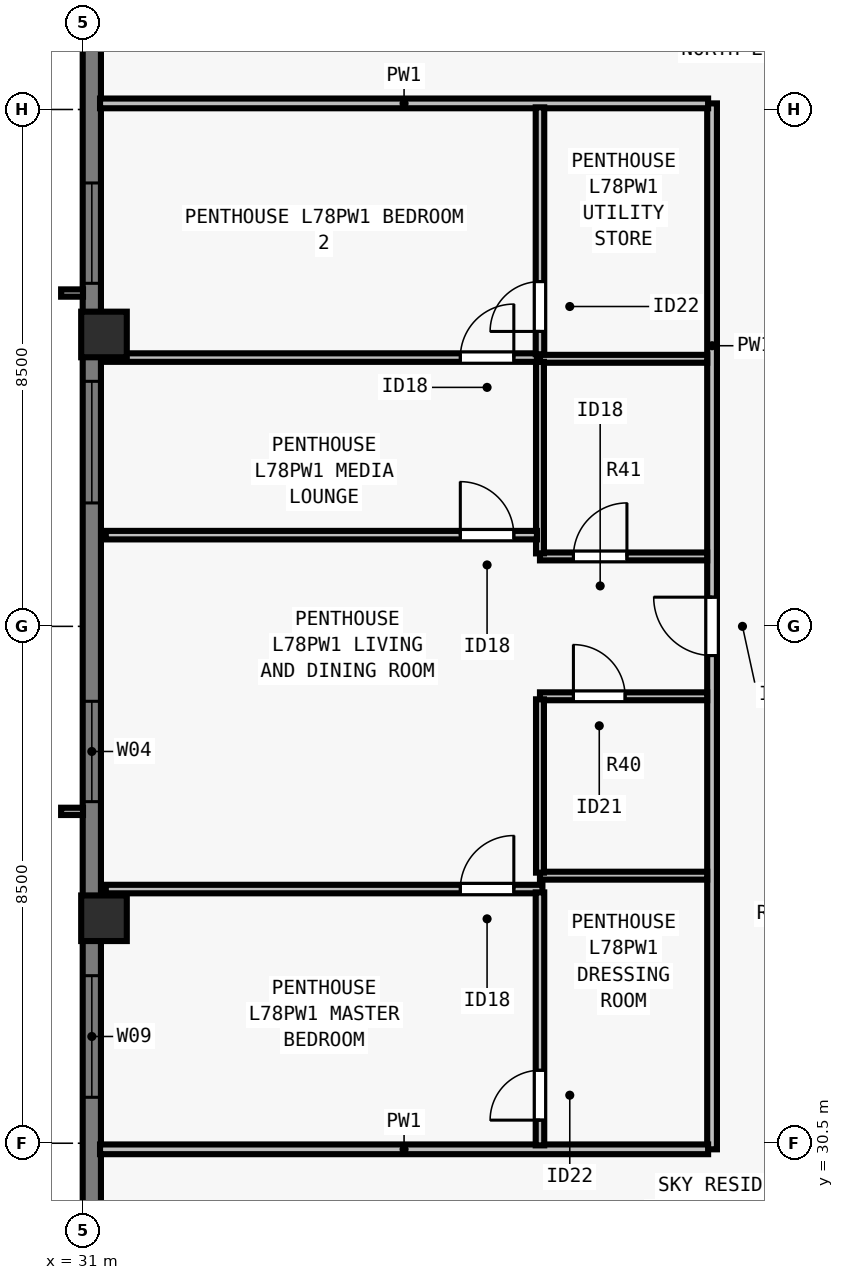
"""IFC4 building model, lengths in metres.
Left out: names, types, materials, properties, quantities, classifications, styles, units other than length and angle.
Written with IfcOpenShell. Run it as: python <this file> out.ifc"""

import sys

from ifc_helpers import new_model, si_unit, direction, frame, frame_2d, origin, origin_2d, place, context, subcontext, project, spatial, rectangle, extrude, element, fill, save


model = new_model("IFC4")
c1 = context("Model", 3, precision=1e-05, world=origin(), true_north=direction((0.0, 1.0)))
c2 = subcontext(c1, "Body", "Model", "MODEL_VIEW")
j1 = project(units=[si_unit("LENGTHUNIT", "METRE"), si_unit("PLANEANGLEUNIT", "RADIAN")], contexts=[c1])
p1 = place(None, origin())
s1 = spatial("IfcSite", under=j1, at=p1, CompositionType="ELEMENT")
p2 = place(p1, origin())
s2 = spatial("IfcBuilding", under=s1, at=p2, CompositionType="ELEMENT")
p3 = place(p2, frame((0.0, 0.0, 284.0)))
s3 = spatial("IfcBuildingStorey", under=s2, at=p3, CompositionType="ELEMENT", Elevation=284.0)
for number, where, z_axis, x_axis in (
    (1, (31.35, 43.8, 0.0), (0.0, 0.0, 1.0), (0.0, 1.0, 0.0)),
    (2, (31.35, 34.2, 0.0), (0.0, 0.0, 1.0), (0.0, 1.0, 0.0)),
):
    element("IfcColumn", number, at=place(p3, frame(where, z_axis=z_axis, x_axis=x_axis)), inside=s3, PredefinedType="COLUMN", context=c2, shape_type="SweptSolid", body=[
        extrude(rectangle(XDim=0.75, YDim=0.75, at=origin_2d()), origin(), (0.0, 0.0, 1.0), 3.5),
    ])
p4 = place(p3, frame((31.15, 23.5, 0.0), z_axis=(0.0, 0.0, 1.0), x_axis=(0.0, 1.0, 0.0)))
e3 = element("IfcWall", 3, at=p4, inside=s3, PredefinedType="SOLIDWALL", context=c2, shape_type="SweptSolid", body=[
    extrude(rectangle(XDim=30.722, YDim=0.3, at=frame_2d((15.361, 0.0))), origin(), (0.0, 0.0, 1.0), 3.29),
])
p5 = place(p4, frame((7.756, 0.0, 0.8)))
e4 = element("IfcOpeningElement", 4, at=p5, cuts=e3, PredefinedType="OPENING", context=c2, shape_type="SweptSolid", body=[
    extrude(rectangle(XDim=2.0, YDim=1.758, at=frame_2d((1.0, 0.879))), frame((0.0, 0.16, 0.0), z_axis=(0.0, -1.0, 0.0), x_axis=(1.0, 0.0, 0.0)), (0.0, 0.0, 1.0), 0.32),
])
p6 = place(p4, frame((12.617, 0.0, 0.8)))
e5 = element("IfcOpeningElement", 5, at=p6, cuts=e3, PredefinedType="OPENING", context=c2, shape_type="SweptSolid", body=[
    extrude(rectangle(XDim=1.65, YDim=1.758, at=frame_2d((0.825, 0.879))), frame((0.0, 0.16, 0.0), z_axis=(0.0, -1.0, 0.0), x_axis=(1.0, 0.0, 0.0)), (0.0, 0.0, 1.0), 0.32),
])
p7 = place(p4, frame((17.53, 0.0, 0.8)))
e6 = element("IfcOpeningElement", 6, at=p7, cuts=e3, PredefinedType="OPENING", context=c2, shape_type="SweptSolid", body=[
    extrude(rectangle(XDim=2.0, YDim=1.758, at=frame_2d((1.0, 0.879))), frame((0.0, 0.16, 0.0), z_axis=(0.0, -1.0, 0.0), x_axis=(1.0, 0.0, 0.0)), (0.0, 0.0, 1.0), 0.32),
])
p8 = place(p4, frame((21.142, 0.0, 0.8)))
e7 = element("IfcOpeningElement", 7, at=p8, cuts=e3, PredefinedType="OPENING", context=c2, shape_type="SweptSolid", body=[
    extrude(rectangle(XDim=1.65, YDim=1.758, at=frame_2d((0.825, 0.879))), frame((0.0, 0.16, 0.0), z_axis=(0.0, -1.0, 0.0), x_axis=(1.0, 0.0, 0.0)), (0.0, 0.0, 1.0), 0.32),
])
p9 = place(p4, frame((26.63, 0.0, 0.8)))
e8 = element("IfcOpeningElement", 8, at=p9, cuts=e3, PredefinedType="OPENING", context=c2, shape_type="SweptSolid", body=[
    extrude(rectangle(XDim=0.9, YDim=1.75, at=frame_2d((0.45, 0.875))), frame((0.0, 0.16, 0.0), z_axis=(0.0, -1.0, 0.0), x_axis=(1.0, 0.0, 0.0)), (0.0, 0.0, 1.0), 0.32),
])
p10 = place(p3, frame((41.35, 30.4, 0.0), z_axis=(0.0, 0.0, 1.0), x_axis=(0.0, 1.0, 0.0)))
e9 = element("IfcWall", 9, at=p10, inside=s3, PredefinedType="PARTITIONING", context=c2, shape_type="SweptSolid", body=[
    extrude(rectangle(XDim=17.2, YDim=0.16, at=frame_2d((8.6, 0.0))), origin(), (0.0, 0.0, 1.0), 3.009),
])
p11 = place(p10, frame((8.12, 0.0, 0.0)))
e10 = element("IfcOpeningElement", 10, at=p11, cuts=e9, PredefinedType="OPENING", context=c2, shape_type="SweptSolid", body=[
    extrude(rectangle(XDim=0.96, YDim=2.18, at=frame_2d((0.48, 1.09))), frame((0.0, 0.09, 0.0), z_axis=(0.0, -1.0, 0.0), x_axis=(1.0, 0.0, 0.0)), (0.0, 0.0, 1.0), 0.18),
])
for number, where, z_axis, x_axis in (
    (11, (31.285, 30.4, 0.0), (0.0, 0.0, 1.0), (1.0, 0.0, 0.0)),
    (12, (31.285, 47.6, 0.0), (0.0, 0.0, 1.0), (1.0, 0.0, 0.0)),
):
    element("IfcWall", number, at=place(p3, frame(where, z_axis=z_axis, x_axis=x_axis)), inside=s3, PredefinedType="PARTITIONING", context=c2, shape_type="SweptSolid", body=[
        extrude(rectangle(XDim=10.0, YDim=0.16, at=frame_2d((5.0, 0.0))), origin(), (0.0, 0.0, 1.0), 3.29),
    ])
p12 = place(p3, frame((38.52, 34.9, 0.0), z_axis=(0.0, 0.0, 1.0), x_axis=(1.0, 0.0, 0.0)))
e13 = element("IfcWall", 13, at=p12, inside=s3, PredefinedType="PLUMBINGWALL", context=c2, shape_type="SweptSolid", body=[
    extrude(rectangle(XDim=2.75, YDim=0.13, at=frame_2d((1.375, 0.0))), origin(), (0.0, 0.0, 1.0), 3.29),
])
p13 = place(p3, frame((38.52, 37.85, 0.0), z_axis=(0.0, 0.0, 1.0), x_axis=(1.0, 0.0, 0.0)))
e14 = element("IfcWall", 14, at=p13, inside=s3, PredefinedType="PLUMBINGWALL", context=c2, shape_type="SweptSolid", body=[
    extrude(rectangle(XDim=2.75, YDim=0.13, at=frame_2d((1.375, 0.0))), origin(), (0.0, 0.0, 1.0), 3.29),
])
p14 = place(p13, frame((0.55, 0.0, 0.0)))
e15 = element("IfcOpeningElement", 15, at=p14, cuts=e14, PredefinedType="OPENING", context=c2, shape_type="SweptSolid", body=[
    extrude(rectangle(XDim=0.85, YDim=2.08, at=frame_2d((0.425, 1.04))), frame((0.0, 0.075, 0.0), z_axis=(0.0, -1.0, 0.0), x_axis=(1.0, 0.0, 0.0)), (0.0, 0.0, 1.0), 0.15),
])
p15 = place(p3, frame((38.52, 34.95, 0.0), z_axis=(0.0, 0.0, 1.0), x_axis=(0.0, 1.0, 0.0)))
e16 = element("IfcWall", 16, at=p15, inside=s3, PredefinedType="PLUMBINGWALL", context=c2, shape_type="SweptSolid", body=[
    extrude(rectangle(XDim=2.85, YDim=0.13, at=frame_2d((1.425, 0.0))), origin(), (0.0, 0.0, 1.0), 3.29),
])
p16 = place(p3, frame((38.52, 43.4, 0.0), z_axis=(0.0, 0.0, 1.0), x_axis=(1.0, 0.0, 0.0)))
e17 = element("IfcWall", 17, at=p16, inside=s3, PredefinedType="PLUMBINGWALL", context=c2, shape_type="SweptSolid", body=[
    extrude(rectangle(XDim=2.75, YDim=0.13, at=frame_2d((1.375, 0.0))), origin(), (0.0, 0.0, 1.0), 3.29),
])
p17 = place(p3, frame((38.52, 40.15, 0.0), z_axis=(0.0, 0.0, 1.0), x_axis=(1.0, 0.0, 0.0)))
e18 = element("IfcWall", 18, at=p17, inside=s3, PredefinedType="PLUMBINGWALL", context=c2, shape_type="SweptSolid", body=[
    extrude(rectangle(XDim=2.75, YDim=0.13, at=frame_2d((1.375, 0.0))), origin(), (0.0, 0.0, 1.0), 3.29),
])
p18 = place(p17, frame((0.55, 0.0, 0.0)))
e19 = element("IfcOpeningElement", 19, at=p18, cuts=e18, PredefinedType="OPENING", context=c2, shape_type="SweptSolid", body=[
    extrude(rectangle(XDim=0.88, YDim=2.1, at=frame_2d((0.44, 1.05))), frame((0.0, 0.075, 0.0), z_axis=(0.0, -1.0, 0.0), x_axis=(1.0, 0.0, 0.0)), (0.0, 0.0, 1.0), 0.15),
])
p19 = place(p3, frame((38.52, 40.2, 0.0), z_axis=(0.0, 0.0, 1.0), x_axis=(0.0, 1.0, 0.0)))
e20 = element("IfcWall", 20, at=p19, inside=s3, PredefinedType="PLUMBINGWALL", context=c2, shape_type="SweptSolid", body=[
    extrude(rectangle(XDim=3.15, YDim=0.13, at=frame_2d((1.575, 0.0))), origin(), (0.0, 0.0, 1.0), 3.009),
])
p20 = place(p3, frame((31.38, 34.68, 0.0), z_axis=(0.0, 0.0, 1.0), x_axis=(1.0, 0.0, 0.0)))
e21 = element("IfcWall", 21, at=p20, inside=s3, PredefinedType="PARTITIONING", context=c2, shape_type="SweptSolid", body=[
    extrude(rectangle(XDim=7.18, YDim=0.14, at=frame_2d((3.59, 0.0))), origin(), (0.0, 0.0, 1.0), 3.29),
])
p21 = place(p20, frame((5.83, 0.0, 0.0)))
e22 = element("IfcOpeningElement", 22, at=p21, cuts=e21, PredefinedType="OPENING", context=c2, shape_type="SweptSolid", body=[
    extrude(rectangle(XDim=0.88, YDim=2.1, at=frame_2d((0.44, 1.05))), frame((0.0, 0.08, 0.0), z_axis=(0.0, -1.0, 0.0), x_axis=(1.0, 0.0, 0.0)), (0.0, 0.0, 1.0), 0.16),
])
p22 = place(p3, frame((38.52, 30.465, 0.0), z_axis=(0.0, 0.0, 1.0), x_axis=(0.0, 1.0, 0.0)))
e23 = element("IfcWall", 23, at=p22, inside=s3, PredefinedType="PARTITIONING", context=c2, shape_type="SweptSolid", body=[
    extrude(rectangle(XDim=4.16, YDim=0.14, at=frame_2d((2.08, 0.0))), origin(), (0.0, 0.0, 1.0), 3.29),
])
p23 = place(p22, frame((0.415, 0.0, 0.0)))
e24 = element("IfcOpeningElement", 24, at=p23, cuts=e23, PredefinedType="OPENING", context=c2, shape_type="SweptSolid", body=[
    extrude(rectangle(XDim=0.82, YDim=2.1, at=frame_2d((0.41, 1.05))), frame((0.0, 0.08, 0.0), z_axis=(0.0, -1.0, 0.0), x_axis=(1.0, 0.0, 0.0)), (0.0, 0.0, 1.0), 0.16),
])
p24 = place(p3, frame((31.38, 43.42, 0.0), z_axis=(0.0, 0.0, 1.0), x_axis=(1.0, 0.0, 0.0)))
e25 = element("IfcWall", 25, at=p24, inside=s3, PredefinedType="PARTITIONING", context=c2, shape_type="SweptSolid", body=[
    extrude(rectangle(XDim=7.09, YDim=0.14, at=frame_2d((3.545, 0.0))), origin(), (0.0, 0.0, 1.0), 3.29),
])
p25 = place(p24, frame((5.83, 0.0, 0.0)))
e26 = element("IfcOpeningElement", 26, at=p25, cuts=e25, PredefinedType="OPENING", context=c2, shape_type="SweptSolid", body=[
    extrude(rectangle(XDim=0.88, YDim=2.1, at=frame_2d((0.44, 1.05))), frame((0.0, 0.08, 0.0), z_axis=(0.0, -1.0, 0.0), x_axis=(1.0, 0.0, 0.0)), (0.0, 0.0, 1.0), 0.16),
])
p26 = place(p3, frame((38.52, 43.475, 0.0), z_axis=(0.0, 0.0, 1.0), x_axis=(0.0, 1.0, 0.0)))
e27 = element("IfcWall", 27, at=p26, inside=s3, PredefinedType="PARTITIONING", context=c2, shape_type="SweptSolid", body=[
    extrude(rectangle(XDim=4.06, YDim=0.14, at=frame_2d((2.03, 0.0))), origin(), (0.0, 0.0, 1.0), 3.29),
])
p27 = place(p26, frame((0.375, 0.0, 0.0)))
e28 = element("IfcOpeningElement", 28, at=p27, cuts=e27, PredefinedType="OPENING", context=c2, shape_type="SweptSolid", body=[
    extrude(rectangle(XDim=0.82, YDim=2.1, at=frame_2d((0.41, 1.05))), frame((0.0, 0.08, 0.0), z_axis=(0.0, -1.0, 0.0), x_axis=(1.0, 0.0, 0.0)), (0.0, 0.0, 1.0), 0.16),
])
p28 = place(p3, frame((31.38, 40.5, 0.0), z_axis=(0.0, 0.0, 1.0), x_axis=(1.0, 0.0, 0.0)))
e29 = element("IfcWall", 29, at=p28, inside=s3, PredefinedType="PARTITIONING", context=c2, shape_type="SweptSolid", body=[
    extrude(rectangle(XDim=7.09, YDim=0.14, at=frame_2d((3.545, 0.0))), origin(), (0.0, 0.0, 1.0), 3.29),
])
p29 = place(p28, frame((5.83, 0.0, 0.0)))
e30 = element("IfcOpeningElement", 30, at=p29, cuts=e29, PredefinedType="OPENING", context=c2, shape_type="SweptSolid", body=[
    extrude(rectangle(XDim=0.88, YDim=2.1, at=frame_2d((0.44, 1.05))), frame((0.0, 0.08, 0.0), z_axis=(0.0, -1.0, 0.0), x_axis=(1.0, 0.0, 0.0)), (0.0, 0.0, 1.0), 0.16),
])
p30 = place(p5, origin())
e31 = element("IfcWindow", 31, at=p30, inside=s3, PartitioningType="SINGLE_PANEL", PredefinedType="WINDOW", context=c2, shape_type="SweptSolid", body=[
    extrude(rectangle(XDim=2.0, YDim=1.758, at=frame_2d((1.0, 0.879))), frame((0.0, -0.05, 0.0), z_axis=(0.0, -1.0, 0.0), x_axis=(1.0, 0.0, 0.0)), (0.0, 0.0, 1.0), 0.06),
])
fill(e4, e31)
p31 = place(p6, origin())
e32 = element("IfcWindow", 32, at=p31, inside=s3, PartitioningType="SINGLE_PANEL", PredefinedType="WINDOW", context=c2, shape_type="SweptSolid", body=[
    extrude(rectangle(XDim=1.65, YDim=1.758, at=frame_2d((0.825, 0.879))), frame((0.0, -0.05, 0.0), z_axis=(0.0, -1.0, 0.0), x_axis=(1.0, 0.0, 0.0)), (0.0, 0.0, 1.0), 0.06),
])
fill(e5, e32)
p32 = place(p7, origin())
e33 = element("IfcWindow", 33, at=p32, inside=s3, PartitioningType="SINGLE_PANEL", PredefinedType="WINDOW", context=c2, shape_type="SweptSolid", body=[
    extrude(rectangle(XDim=2.0, YDim=1.758, at=frame_2d((1.0, 0.879))), frame((0.0, -0.05, 0.0), z_axis=(0.0, -1.0, 0.0), x_axis=(1.0, 0.0, 0.0)), (0.0, 0.0, 1.0), 0.06),
])
fill(e6, e33)
p33 = place(p8, origin())
e34 = element("IfcWindow", 34, at=p33, inside=s3, PartitioningType="SINGLE_PANEL", PredefinedType="WINDOW", context=c2, shape_type="SweptSolid", body=[
    extrude(rectangle(XDim=1.65, YDim=1.758, at=frame_2d((0.825, 0.879))), frame((0.0, -0.05, 0.0), z_axis=(0.0, -1.0, 0.0), x_axis=(1.0, 0.0, 0.0)), (0.0, 0.0, 1.0), 0.06),
])
fill(e7, e34)
p34 = place(p14, origin())
e35 = element("IfcDoor", 35, at=p34, inside=s3, OperationType="SINGLE_SWING_LEFT", PredefinedType="DOOR", context=c2, shape_type="SweptSolid", body=[
    extrude(rectangle(XDim=0.85, YDim=2.08, at=frame_2d((0.425, 1.04))), frame((0.0, 0.025, 0.0), z_axis=(0.0, -1.0, 0.0), x_axis=(1.0, 0.0, 0.0)), (0.0, 0.0, 1.0), 0.05),
])
fill(e15, e35)
p35 = place(p18, origin())
e36 = element("IfcDoor", 36, at=p35, inside=s3, OperationType="SINGLE_SWING_RIGHT", PredefinedType="DOOR", context=c2, shape_type="SweptSolid", body=[
    extrude(rectangle(XDim=0.88, YDim=2.1, at=frame_2d((0.44, 1.05))), frame((0.0, 0.025, 0.0), z_axis=(0.0, -1.0, 0.0), x_axis=(1.0, 0.0, 0.0)), (0.0, 0.0, 1.0), 0.05),
])
fill(e19, e36)
p36 = place(p23, origin())
e37 = element("IfcDoor", 37, at=p36, inside=s3, OperationType="SINGLE_SWING_LEFT", PredefinedType="DOOR", context=c2, shape_type="SweptSolid", body=[
    extrude(rectangle(XDim=0.82, YDim=2.1, at=frame_2d((0.41, 1.05))), frame((0.0, 0.025, 0.0), z_axis=(0.0, -1.0, 0.0), x_axis=(1.0, 0.0, 0.0)), (0.0, 0.0, 1.0), 0.05),
])
fill(e24, e37)
p37 = place(p21, origin())
e38 = element("IfcDoor", 38, at=p37, inside=s3, OperationType="SINGLE_SWING_RIGHT", PredefinedType="DOOR", context=c2, shape_type="SweptSolid", body=[
    extrude(rectangle(XDim=0.88, YDim=2.1, at=frame_2d((0.44, 1.05))), frame((0.0, 0.025, 0.0), z_axis=(0.0, -1.0, 0.0), x_axis=(1.0, 0.0, 0.0)), (0.0, 0.0, 1.0), 0.05),
])
fill(e22, e38)
p38 = place(p27, origin())
e39 = element("IfcDoor", 39, at=p38, inside=s3, OperationType="SINGLE_SWING_LEFT", PredefinedType="DOOR", context=c2, shape_type="SweptSolid", body=[
    extrude(rectangle(XDim=0.82, YDim=2.1, at=frame_2d((0.41, 1.05))), frame((0.0, 0.025, 0.0), z_axis=(0.0, -1.0, 0.0), x_axis=(1.0, 0.0, 0.0)), (0.0, 0.0, 1.0), 0.05),
])
fill(e28, e39)
p39 = place(p25, origin())
e40 = element("IfcDoor", 40, at=p39, inside=s3, OperationType="SINGLE_SWING_RIGHT", PredefinedType="DOOR", context=c2, shape_type="SweptSolid", body=[
    extrude(rectangle(XDim=0.88, YDim=2.1, at=frame_2d((0.44, 1.05))), frame((0.0, 0.025, 0.0), z_axis=(0.0, -1.0, 0.0), x_axis=(1.0, 0.0, 0.0)), (0.0, 0.0, 1.0), 0.05),
])
fill(e26, e40)
p40 = place(p29, origin())
e41 = element("IfcDoor", 41, at=p40, inside=s3, OperationType="SINGLE_SWING_LEFT", PredefinedType="DOOR", context=c2, shape_type="SweptSolid", body=[
    extrude(rectangle(XDim=0.88, YDim=2.1, at=frame_2d((0.44, 1.05))), frame((0.0, 0.025, 0.0), z_axis=(0.0, -1.0, 0.0), x_axis=(1.0, 0.0, 0.0)), (0.0, 0.0, 1.0), 0.05),
])
fill(e30, e41)
p41 = place(p11, origin())
e42 = element("IfcDoor", 42, at=p41, inside=s3, OperationType="SINGLE_SWING_RIGHT", PredefinedType="DOOR", context=c2, shape_type="SweptSolid", body=[
    extrude(rectangle(XDim=0.96, YDim=2.18, at=frame_2d((0.48, 1.09))), frame((0.0, 0.025, 0.0), z_axis=(0.0, -1.0, 0.0), x_axis=(1.0, 0.0, 0.0)), (0.0, 0.0, 1.0), 0.05),
])
fill(e10, e42)
save(model, sys.argv[1])
